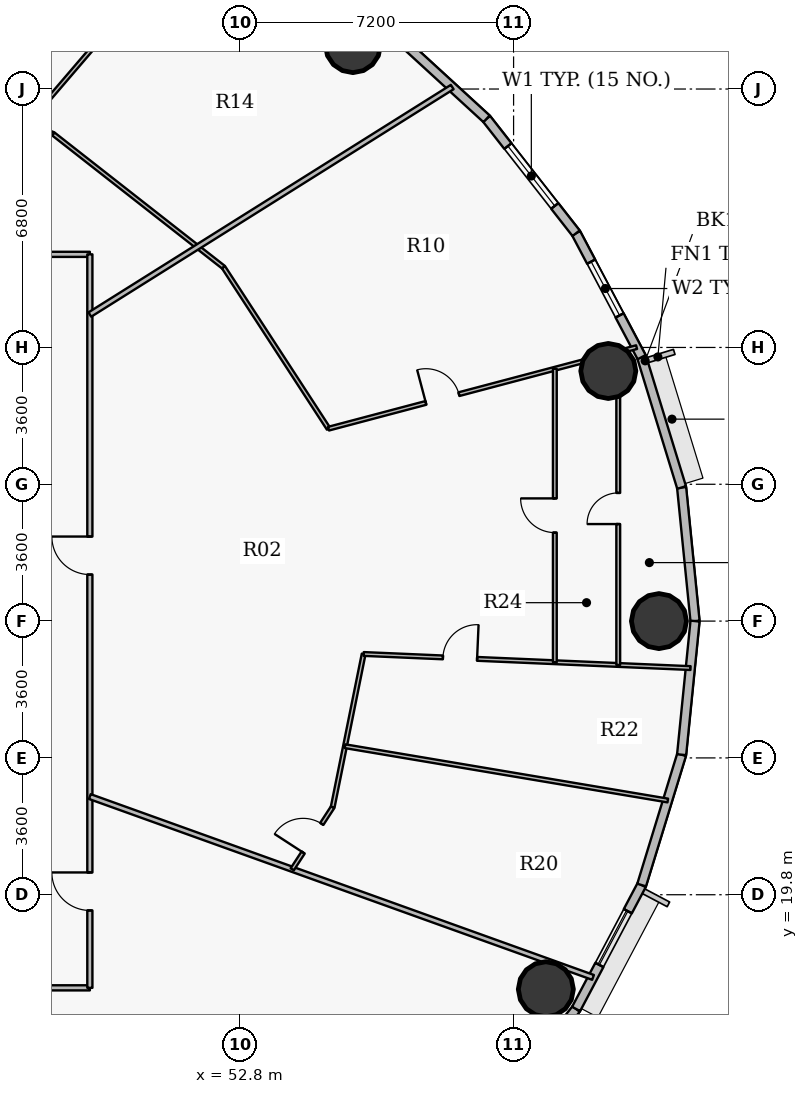
"""IFC4 building model, lengths in metres.
Left out: names, types, materials, properties, quantities, classifications, styles, units other than length and angle.
Written with IfcOpenShell. Run it as: python <this file> out.ifc"""

import sys

from ifc_helpers import new_model, si_unit, direction, frame, frame_2d, origin, origin_2d, place, context, subcontext, project, spatial, rectangle, hollow_circle, extrude, source, transform, mapped, element, fill, save


model = new_model("IFC4")
c1 = context("Model", 3, precision=1e-05, world=origin(), true_north=direction((0.0, 1.0)))
c2 = subcontext(c1, "Body", "Model", "MODEL_VIEW")
j1 = project(units=[si_unit("LENGTHUNIT", "METRE"), si_unit("PLANEANGLEUNIT", "RADIAN")], contexts=[c1])
p1 = place(None, origin())
s1 = spatial("IfcSite", under=j1, at=p1, CompositionType="ELEMENT")
p2 = place(p1, origin())
s2 = spatial("IfcBuilding", under=s1, at=p2, CompositionType="ELEMENT")
p3 = place(p2, frame((0.0, 0.0, 123.45)))
s3 = spatial("IfcBuildingStorey", under=s2, at=p3, CompositionType="ELEMENT", Elevation=123.45)
for number, where, z_axis, x_axis in (
    (1, (63.825, 27.0, 0.0), (0.0, 0.0, 1.0), (1.0, 0.0, 0.0)),
    (2, (62.493, 33.581, 0.0), (0.0, 0.0, 1.0), (1.0, 0.0, 0.0)),
    (3, (55.773, 42.156, 0.0), (0.0, 0.0, 1.0), (1.0, 0.0, 0.0)),
    (4, (60.849, 17.312, 0.0), (0.0, 0.0, 1.0), (1.0, 0.0, 0.0)),
):
    element("IfcColumn", number, at=place(p3, frame(where, z_axis=z_axis, x_axis=x_axis)), inside=s3, PredefinedType="COLUMN", context=c2, shape_type="SweptSolid", body=[
        extrude(hollow_circle(Radius=0.725, WallThickness=0.042, at=origin_2d()), origin(), (0.0, 0.0, 1.0), 3.75),
    ])
p4 = place(p3, frame((64.422, 30.515, 0.0), z_axis=(0.0, 0.0, 1.0), x_axis=(0.099989468229, -0.994988495533, 0.0)))
e5 = element("IfcWall", 5, at=p4, inside=s3, PredefinedType="SOLIDWALL", context=c2, shape_type="SweptSolid", body=[
    extrude(rectangle(XDim=3.533, YDim=0.24, at=frame_2d((1.767, 0.0))), origin(), (0.0, 0.0, 1.0), 3.5),
])
p5 = place(p3, frame((63.37, 33.945, 0.0), z_axis=(0.0, 0.0, 1.0), x_axis=(0.293124431344, -0.956074300329, 0.0)))
e6 = element("IfcWall", 6, at=p5, inside=s3, PredefinedType="SOLIDWALL", context=c2, shape_type="SweptSolid", body=[
    extrude(rectangle(XDim=3.587, YDim=0.24, at=frame_2d((1.793, 0.0))), origin(), (0.0, 0.0, 1.0), 3.5),
])
p6 = place(p3, frame((61.645, 37.206, 0.0), z_axis=(0.0, 0.0, 1.0), x_axis=(0.467614004126, -0.883932770716, 0.0)))
e7 = element("IfcWall", 7, at=p6, inside=s3, PredefinedType="SOLIDWALL", context=c2, shape_type="SweptSolid", body=[
    extrude(rectangle(XDim=3.689, YDim=0.24, at=frame_2d((1.844, 0.0))), origin(), (0.0, 0.0, 1.0), 3.5),
])
p7 = place(p6, frame((0.846, 0.0, 0.9)))
e8 = element("IfcOpeningElement", 8, at=p7, cuts=e7, PredefinedType="OPENING", context=c2, shape_type="SweptSolid", body=[
    extrude(rectangle(XDim=1.6, YDim=1.75, at=origin_2d()), frame((0.8, 0.13, 0.875), z_axis=(0.0, -1.0, 0.0), x_axis=(1.0, 0.0, 0.0)), (0.0, 0.0, 1.0), 0.26),
])
p8 = place(p3, frame((59.289, 40.217, 0.0), z_axis=(0.0, 0.0, 1.0), x_axis=(0.616272103517, -0.787533297345, 0.0)))
e9 = element("IfcWall", 9, at=p8, inside=s3, PredefinedType="SOLIDWALL", context=c2, shape_type="SweptSolid", body=[
    extrude(rectangle(XDim=3.823, YDim=0.24, at=frame_2d((1.912, 0.0))), origin(), (0.0, 0.0, 1.0), 3.5),
])
p9 = place(p8, frame((0.912, 0.0, 0.9)))
e10 = element("IfcOpeningElement", 10, at=p9, cuts=e9, PredefinedType="OPENING", context=c2, shape_type="SweptSolid", body=[
    extrude(rectangle(XDim=2.0, YDim=1.75, at=origin_2d()), frame((1.0, 0.13, 0.875), z_axis=(0.0, -1.0, 0.0), x_axis=(1.0, 0.0, 0.0)), (0.0, 0.0, 1.0), 0.26),
])
p10 = place(p3, frame((56.358, 42.903, 0.0), z_axis=(0.0, 0.0, 1.0), x_axis=(0.737113356241, -0.675769117414, 0.0)))
e11 = element("IfcWall", 11, at=p10, inside=s3, PredefinedType="SOLIDWALL", context=c2, shape_type="SweptSolid", body=[
    extrude(rectangle(XDim=3.976, YDim=0.24, at=frame_2d((1.988, 0.0))), origin(), (0.0, 0.0, 1.0), 3.5),
])
p11 = place(p3, frame((61.645, 16.794, 0.0), z_axis=(0.0, 0.0, 1.0), x_axis=(-0.616272103517, -0.787533297345, 0.0)))
e12 = element("IfcWall", 12, at=p11, inside=s3, PredefinedType="SOLIDWALL", context=c2, shape_type="SweptSolid", body=[
    extrude(rectangle(XDim=3.823, YDim=0.24, at=frame_2d((1.912, 0.0))), origin(), (0.0, 0.0, 1.0), 3.5),
])
p12 = place(p3, frame((63.37, 20.055, 0.0), z_axis=(0.0, 0.0, 1.0), x_axis=(-0.467614004126, -0.883932770716, 0.0)))
e13 = element("IfcWall", 13, at=p12, inside=s3, PredefinedType="SOLIDWALL", context=c2, shape_type="SweptSolid", body=[
    extrude(rectangle(XDim=3.689, YDim=0.24, at=frame_2d((1.844, 0.0))), origin(), (0.0, 0.0, 1.0), 3.5),
])
p13 = place(p12, frame((0.778, 0.0, 0.9)))
e14 = element("IfcOpeningElement", 14, at=p13, cuts=e13, PredefinedType="OPENING", context=c2, shape_type="SweptSolid", body=[
    extrude(rectangle(XDim=1.6, YDim=1.75, at=origin_2d()), frame((0.8, 0.13, 0.875), z_axis=(0.0, -1.0, 0.0), x_axis=(1.0, 0.0, 0.0)), (0.0, 0.0, 1.0), 0.26),
])
p14 = place(p3, frame((64.422, 23.485, 0.0), z_axis=(0.0, 0.0, 1.0), x_axis=(-0.293124431344, -0.956074300329, 0.0)))
e15 = element("IfcWall", 15, at=p14, inside=s3, PredefinedType="SOLIDWALL", context=c2, shape_type="SweptSolid", body=[
    extrude(rectangle(XDim=3.587, YDim=0.24, at=frame_2d((1.793, 0.0))), origin(), (0.0, 0.0, 1.0), 3.5),
])
p15 = place(p3, frame((64.775, 27.0, 0.0), z_axis=(0.0, 0.0, 1.0), x_axis=(-0.099989468229, -0.994988495533, 0.0)))
e16 = element("IfcWall", 16, at=p15, inside=s3, PredefinedType="SOLIDWALL", context=c2, shape_type="SweptSolid", body=[
    extrude(rectangle(XDim=3.533, YDim=0.24, at=frame_2d((1.767, 0.0))), origin(), (0.0, 0.0, 1.0), 3.5),
])
p16 = place(p3, frame((35.584, 17.35, 0.0), z_axis=(0.0, 0.0, 1.0), x_axis=(1.0, 0.0, 0.0)))
e17 = element("IfcWall", 17, at=p16, inside=s3, PredefinedType="PARTITIONING", context=c2, shape_type="SweptSolid", body=[
    extrude(rectangle(XDim=13.266, YDim=0.135, at=frame_2d((6.633, 0.0))), origin(), (0.0, 0.0, 1.0), 2.935),
])
p17 = place(p16, frame((2.757, 0.0, 0.0)))
e18 = element("IfcOpeningElement", 18, at=p17, cuts=e17, PredefinedType="OPENING", context=c2, shape_type="SweptSolid", body=[
    extrude(rectangle(XDim=1.0, YDim=2.15, at=origin_2d()), frame((0.5, 0.078, 1.075), z_axis=(0.0, -1.0, 0.0), x_axis=(1.0, 0.0, 0.0)), (0.0, 0.0, 1.0), 0.155),
])
p18 = place(p3, frame((38.477, 36.65, 0.0), z_axis=(0.0, 0.0, 1.0), x_axis=(1.0, 0.0, 0.0)))
e19 = element("IfcWall", 19, at=p18, inside=s3, PredefinedType="PARTITIONING", context=c2, shape_type="SweptSolid", body=[
    extrude(rectangle(XDim=10.373, YDim=0.135, at=frame_2d((5.187, 0.0))), origin(), (0.0, 0.0, 1.0), 2.935),
])
p19 = place(p18, frame((5.621, 0.0, 0.0)))
e20 = element("IfcOpeningElement", 20, at=p19, cuts=e19, PredefinedType="OPENING", context=c2, shape_type="SweptSolid", body=[
    extrude(rectangle(XDim=1.0, YDim=2.15, at=origin_2d()), frame((0.5, 0.078, 1.075), z_axis=(0.0, -1.0, 0.0), x_axis=(1.0, 0.0, 0.0)), (0.0, 0.0, 1.0), 0.155),
])
p20 = place(p3, frame((42.058, 17.35, 0.0), z_axis=(0.0, 0.0, 1.0), x_axis=(0.531660079213, -0.846957826678, 0.0)))
e21 = element("IfcWall", 21, at=p20, inside=s3, PredefinedType="PARTITIONING", context=c2, shape_type="SweptSolid", body=[
    extrude(rectangle(XDim=12.437, YDim=0.135, at=frame_2d((6.219, 0.0))), origin(), (0.0, 0.0, 1.0), 2.935),
])
p21 = place(p3, frame((47.212, 40.087, 0.0), z_axis=(0.0, 0.0, 1.0), x_axis=(0.928752817467, -0.370699614307, 0.0)))
e22 = element("IfcWall", 22, at=p21, inside=s3, PredefinedType="PARTITIONING", context=c2, shape_type="SweptSolid", body=[
    extrude(rectangle(XDim=0.731, YDim=0.1, at=frame_2d((0.365, 0.0))), origin(), (0.0, 0.0, 1.0), 3.085),
])
p22 = place(p3, frame((47.212, 40.087, 0.0), z_axis=(0.0, 0.0, 1.0), x_axis=(0.650621399292, 0.759402261508, 0.0)))
e23 = element("IfcWall", 23, at=p22, inside=s3, PredefinedType="PARTITIONING", context=c2, shape_type="SweptSolid", body=[
    extrude(rectangle(XDim=7.334, YDim=0.1, at=frame_2d((3.667, 0.0))), origin(), (0.0, 0.0, 1.0), 2.935),
])
p23 = place(p22, frame((3.217, 0.0, 0.0)))
e24 = element("IfcOpeningElement", 24, at=p23, cuts=e23, PredefinedType="OPENING", context=c2, shape_type="SweptSolid", body=[
    extrude(rectangle(XDim=0.9, YDim=2.1, at=origin_2d()), frame((0.45, 0.06, 1.05), z_axis=(0.0, -1.0, 0.0), x_axis=(1.0, 0.0, 0.0)), (0.0, 0.0, 1.0), 0.12),
])
p24 = place(p3, frame((47.891, 39.816, 0.0), z_axis=(0.0, 0.0, 1.0), x_axis=(0.787338202739, -0.616521333376, 0.0)))
e25 = element("IfcWall", 25, at=p24, inside=s3, PredefinedType="PARTITIONING", context=c2, shape_type="SweptSolid", body=[
    extrude(rectangle(XDim=5.684, YDim=0.1, at=frame_2d((2.842, 0.0))), origin(), (0.0, 0.0, 1.0), 2.935),
])
p25 = place(p3, frame((48.85, 17.35, 0.0), z_axis=(0.0, 0.0, 1.0), x_axis=(0.0, 1.0, 0.0)))
e26 = element("IfcWall", 26, at=p25, inside=s3, PredefinedType="PARTITIONING", context=c2, shape_type="SweptSolid", body=[
    extrude(rectangle(XDim=19.3, YDim=0.135, at=frame_2d((9.65, 0.0))), origin(), (0.0, 0.0, 1.0), 2.935),
])
p26 = place(p25, frame((2.036, 0.0, 0.0)))
e27 = element("IfcOpeningElement", 27, at=p26, cuts=e26, PredefinedType="OPENING", context=c2, shape_type="SweptSolid", body=[
    extrude(rectangle(XDim=1.0, YDim=2.15, at=origin_2d()), frame((0.5, 0.078, 1.075), z_axis=(0.0, -1.0, 0.0), x_axis=(1.0, 0.0, 0.0)), (0.0, 0.0, 1.0), 0.155),
])
p27 = place(p25, frame((10.875, 0.0, 0.0)))
e28 = element("IfcOpeningElement", 28, at=p27, cuts=e26, PredefinedType="OPENING", context=c2, shape_type="SweptSolid", body=[
    extrude(rectangle(XDim=1.0, YDim=2.15, at=origin_2d()), frame((0.5, 0.078, 1.075), z_axis=(0.0, -1.0, 0.0), x_axis=(1.0, 0.0, 0.0)), (0.0, 0.0, 1.0), 0.155),
])
p28 = place(p3, frame((48.85, 22.383, 0.0), z_axis=(0.0, 0.0, 1.0), x_axis=(0.941089213164, -0.338158384292, 0.0)))
e29 = element("IfcWall", 29, at=p28, inside=s3, PredefinedType="PARTITIONING", context=c2, shape_type="SweptSolid", body=[
    extrude(rectangle(XDim=14.069, YDim=0.135, at=frame_2d((7.035, 0.0))), origin(), (0.0, 0.0, 1.0), 2.935),
])
p29 = place(p3, frame((48.85, 35.066, 0.0), z_axis=(0.0, 0.0, 1.0), x_axis=(0.846963568038, 0.531650932866, 0.0)))
e30 = element("IfcWall", 30, at=p29, inside=s3, PredefinedType="PARTITIONING", context=c2, shape_type="SweptSolid", body=[
    extrude(rectangle(XDim=11.258, YDim=0.135, at=frame_2d((5.629, 0.0))), origin(), (0.0, 0.0, 1.0), 2.935),
])
p30 = place(p3, frame((52.366, 36.311, 0.0), z_axis=(0.0, 0.0, 1.0), x_axis=(0.545394651961, -0.838179380331, 0.0)))
e31 = element("IfcWall", 31, at=p30, inside=s3, PredefinedType="PARTITIONING", context=c2, shape_type="SweptSolid", body=[
    extrude(rectangle(XDim=5.068, YDim=0.1, at=frame_2d((2.534, 0.0))), origin(), (0.0, 0.0, 1.0), 3.5),
])
p31 = place(p3, frame((54.176, 20.469, 0.0), z_axis=(0.0, 0.0, 1.0), x_axis=(0.545370803514, 0.838194897786, 0.0)))
e32 = element("IfcWall", 32, at=p31, inside=s3, PredefinedType="PARTITIONING", context=c2, shape_type="SweptSolid", body=[
    extrude(rectangle(XDim=1.952, YDim=0.1, at=frame_2d((0.976, 0.0))), origin(), (0.0, 0.0, 1.0), 3.5),
])
p32 = place(p31, frame((0.526, 0.0, 0.0)))
e33 = element("IfcOpeningElement", 33, at=p32, cuts=e32, PredefinedType="OPENING", context=c2, shape_type="SweptSolid", body=[
    extrude(rectangle(XDim=0.9, YDim=2.1, at=origin_2d()), frame((0.45, 0.06, 1.05), z_axis=(0.0, -1.0, 0.0), x_axis=(1.0, 0.0, 0.0)), (0.0, 0.0, 1.0), 0.12),
])
p33 = place(p3, frame((55.131, 32.063, 0.0), z_axis=(0.0, 0.0, 1.0), x_axis=(0.96671793708, 0.255844542893, 0.0)))
e34 = element("IfcWall", 34, at=p33, inside=s3, PredefinedType="PARTITIONING", context=c2, shape_type="SweptSolid", body=[
    extrude(rectangle(XDim=8.385, YDim=0.1, at=frame_2d((4.192, 0.0))), origin(), (0.0, 0.0, 1.0), 2.935),
])
p34 = place(p33, frame((2.65, 0.0, 0.0)))
e35 = element("IfcOpeningElement", 35, at=p34, cuts=e34, PredefinedType="OPENING", context=c2, shape_type="SweptSolid", body=[
    extrude(rectangle(XDim=0.9, YDim=2.1, at=origin_2d()), frame((0.45, 0.06, 1.05), z_axis=(0.0, -1.0, 0.0), x_axis=(1.0, 0.0, 0.0)), (0.0, 0.0, 1.0), 0.12),
])
p35 = place(p3, frame((55.24, 22.105, 0.0), z_axis=(0.0, 0.0, 1.0), x_axis=(0.198205355444, 0.980160515973, 0.0)))
e36 = element("IfcWall", 36, at=p35, inside=s3, PredefinedType="PARTITIONING", context=c2, shape_type="SweptSolid", body=[
    extrude(rectangle(XDim=4.112, YDim=0.1, at=frame_2d((2.056, 0.0))), origin(), (0.0, 0.0, 1.0), 3.5),
])
p36 = place(p3, frame((55.564, 23.708, 0.0), z_axis=(0.0, 0.0, 1.0), x_axis=(0.986139151265, -0.165920385556, 0.0)))
e37 = element("IfcWall", 37, at=p36, inside=s3, PredefinedType="PARTITIONING", context=c2, shape_type="SweptSolid", body=[
    extrude(rectangle(XDim=8.612, YDim=0.1, at=frame_2d((4.306, 0.0))), origin(), (0.0, 0.0, 1.0), 2.935),
])
p37 = place(p3, frame((56.055, 26.135, 0.0), z_axis=(0.0, 0.0, 1.0), x_axis=(0.999070497197, -0.043106166957, 0.0)))
e38 = element("IfcWall", 38, at=p37, inside=s3, PredefinedType="PARTITIONING", context=c2, shape_type="SweptSolid", body=[
    extrude(rectangle(XDim=8.609, YDim=0.1, at=frame_2d((4.304, 0.0))), origin(), (0.0, 0.0, 1.0), 2.935),
])
p38 = place(p37, frame((2.088, 0.0, 0.0)))
e39 = element("IfcOpeningElement", 39, at=p38, cuts=e38, PredefinedType="OPENING", context=c2, shape_type="SweptSolid", body=[
    extrude(rectangle(XDim=0.9, YDim=2.1, at=origin_2d()), frame((0.45, 0.06, 1.05), z_axis=(0.0, -1.0, 0.0), x_axis=(1.0, 0.0, 0.0)), (0.0, 0.0, 1.0), 0.12),
])
p39 = place(p3, frame((61.085, 25.918, 0.0), z_axis=(0.0, 0.0, 1.0), x_axis=(0.0, 1.0, 0.0)))
e40 = element("IfcWall", 40, at=p39, inside=s3, PredefinedType="PARTITIONING", context=c2, shape_type="SweptSolid", body=[
    extrude(rectangle(XDim=7.721, YDim=0.1, at=frame_2d((3.861, 0.0))), origin(), (0.0, 0.0, 1.0), 2.935),
])
p40 = place(p39, frame((3.411, 0.0, 0.0)))
e41 = element("IfcOpeningElement", 41, at=p40, cuts=e40, PredefinedType="OPENING", context=c2, shape_type="SweptSolid", body=[
    extrude(rectangle(XDim=0.9, YDim=2.1, at=origin_2d()), frame((0.45, 0.06, 1.05), z_axis=(0.0, -1.0, 0.0), x_axis=(1.0, 0.0, 0.0)), (0.0, 0.0, 1.0), 0.12),
])
p41 = place(p3, frame((62.754, 25.846, 0.0), z_axis=(0.0, 0.0, 1.0), x_axis=(0.0, 1.0, 0.0)))
e42 = element("IfcWall", 42, at=p41, inside=s3, PredefinedType="PARTITIONING", context=c2, shape_type="SweptSolid", body=[
    extrude(rectangle(XDim=8.235, YDim=0.1, at=frame_2d((4.117, 0.0))), origin(), (0.0, 0.0, 1.0), 2.935),
])
p42 = place(p41, frame((3.708, 0.0, 0.0)))
e43 = element("IfcOpeningElement", 43, at=p42, cuts=e42, PredefinedType="OPENING", context=c2, shape_type="SweptSolid", body=[
    extrude(rectangle(XDim=0.82, YDim=2.1, at=origin_2d()), frame((0.41, 0.06, 1.05), z_axis=(0.0, -1.0, 0.0), x_axis=(1.0, 0.0, 0.0)), (0.0, 0.0, 1.0), 0.12),
])
m1 = source(origin(), c2, "Body", "SweptSolid", [
    extrude(rectangle(XDim=1.6, YDim=1.75, at=origin_2d()), frame((0.8, 0.03, 0.875), z_axis=(0.0, -1.0, 0.0), x_axis=(1.0, 0.0, 0.0)), (0.0, 0.0, 1.0), 0.06),
])
p43 = place(p7, origin())
e44 = element("IfcWindow", 44, at=p43, inside=s3, PartitioningType="DOUBLE_PANEL_VERTICAL", PredefinedType="WINDOW", context=c2, shape_type="MappedRepresentation", body=[
    mapped(m1, transform((0.0, 0.0, 0.0), x_axis=(1.0, 0.0, 0.0), y_axis=(0.0, 1.0, 0.0), z_axis=(0.0, 0.0, 1.0), scale=1.0)),
])
fill(e8, e44)
m2 = source(origin(), c2, "Body", "SweptSolid", [
    extrude(rectangle(XDim=2.0, YDim=1.75, at=origin_2d()), frame((1.0, 0.03, 0.875), z_axis=(0.0, -1.0, 0.0), x_axis=(1.0, 0.0, 0.0)), (0.0, 0.0, 1.0), 0.06),
])
p44 = place(p9, origin())
e45 = element("IfcWindow", 45, at=p44, inside=s3, PartitioningType="DOUBLE_PANEL_VERTICAL", PredefinedType="WINDOW", context=c2, shape_type="MappedRepresentation", body=[
    mapped(m2, transform((0.0, 0.0, 0.0), x_axis=(1.0, 0.0, 0.0), y_axis=(0.0, 1.0, 0.0), z_axis=(0.0, 0.0, 1.0), scale=1.0)),
])
fill(e10, e45)
p45 = place(p13, origin())
e46 = element("IfcWindow", 46, at=p45, inside=s3, PartitioningType="DOUBLE_PANEL_VERTICAL", PredefinedType="WINDOW", context=c2, shape_type="MappedRepresentation", body=[
    mapped(m1, transform((0.0, 0.0, 0.0), x_axis=(1.0, 0.0, 0.0), y_axis=(0.0, 1.0, 0.0), z_axis=(0.0, 0.0, 1.0), scale=1.0)),
])
fill(e14, e46)
m3 = source(origin(), c2, "Body", "SweptSolid", [
    extrude(rectangle(XDim=1.0, YDim=2.15, at=origin_2d()), frame((0.5, 0.025, 1.075), z_axis=(0.0, -1.0, 0.0), x_axis=(1.0, 0.0, 0.0)), (0.0, 0.0, 1.0), 0.05),
])
p46 = place(p26, origin())
e47 = element("IfcDoor", 47, at=p46, inside=s3, OperationType="SINGLE_SWING_RIGHT", PredefinedType="DOOR", context=c2, shape_type="MappedRepresentation", body=[
    mapped(m3, transform((0.0, 0.0, 0.0), x_axis=(1.0, 0.0, 0.0), y_axis=(0.0, 1.0, 0.0), z_axis=(0.0, 0.0, 1.0), scale=1.0)),
])
fill(e27, e47)
p47 = place(p27, origin())
e48 = element("IfcDoor", 48, at=p47, inside=s3, OperationType="SINGLE_SWING_RIGHT", PredefinedType="DOOR", context=c2, shape_type="MappedRepresentation", body=[
    mapped(m3, transform((0.0, 0.0, 0.0), x_axis=(1.0, 0.0, 0.0), y_axis=(0.0, 1.0, 0.0), z_axis=(0.0, 0.0, 1.0), scale=1.0)),
])
fill(e28, e48)
m4 = source(origin(), c2, "Body", "SweptSolid", [
    extrude(rectangle(XDim=0.9, YDim=2.1, at=origin_2d()), frame((0.45, 0.025, 1.05), z_axis=(0.0, -1.0, 0.0), x_axis=(1.0, 0.0, 0.0)), (0.0, 0.0, 1.0), 0.05),
])
p48 = place(p32, origin())
e49 = element("IfcDoor", 49, at=p48, inside=s3, OperationType="SINGLE_SWING_LEFT", PredefinedType="DOOR", context=c2, shape_type="MappedRepresentation", body=[
    mapped(m4, transform((0.0, 0.0, 0.0), x_axis=(1.0, 0.0, 0.0), y_axis=(0.0, 1.0, 0.0), z_axis=(0.0, 0.0, 1.0), scale=1.0)),
])
fill(e33, e49)
p49 = place(p38, origin())
e50 = element("IfcDoor", 50, at=p49, inside=s3, OperationType="SINGLE_SWING_RIGHT", PredefinedType="DOOR", context=c2, shape_type="MappedRepresentation", body=[
    mapped(m4, transform((0.0, 0.0, 0.0), x_axis=(1.0, 0.0, 0.0), y_axis=(0.0, 1.0, 0.0), z_axis=(0.0, 0.0, 1.0), scale=1.0)),
])
fill(e39, e50)
p50 = place(p34, origin())
e51 = element("IfcDoor", 51, at=p50, inside=s3, OperationType="SINGLE_SWING_LEFT", PredefinedType="DOOR", context=c2, shape_type="MappedRepresentation", body=[
    mapped(m4, transform((0.0, 0.0, 0.0), x_axis=(1.0, 0.0, 0.0), y_axis=(0.0, 1.0, 0.0), z_axis=(0.0, 0.0, 1.0), scale=1.0)),
])
fill(e35, e51)
p51 = place(p40, origin())
e52 = element("IfcDoor", 52, at=p51, inside=s3, OperationType="SINGLE_SWING_RIGHT", PredefinedType="DOOR", context=c2, shape_type="MappedRepresentation", body=[
    mapped(m4, transform((0.0, 0.0, 0.0), x_axis=(1.0, 0.0, 0.0), y_axis=(0.0, 1.0, 0.0), z_axis=(0.0, 0.0, 1.0), scale=1.0)),
])
fill(e41, e52)
m5 = source(origin(), c2, "Body", "SweptSolid", [
    extrude(rectangle(XDim=0.82, YDim=2.1, at=origin_2d()), frame((0.41, 0.025, 1.05), z_axis=(0.0, -1.0, 0.0), x_axis=(1.0, 0.0, 0.0)), (0.0, 0.0, 1.0), 0.05),
])
p52 = place(p42, origin())
e53 = element("IfcDoor", 53, at=p52, inside=s3, OperationType="SINGLE_SWING_LEFT", PredefinedType="DOOR", context=c2, shape_type="MappedRepresentation", body=[
    mapped(m5, transform((0.0, 0.0, 0.0), x_axis=(1.0, 0.0, 0.0), y_axis=(0.0, 1.0, 0.0), z_axis=(0.0, 0.0, 1.0), scale=1.0)),
])
fill(e43, e53)
save(model, sys.argv[1])
